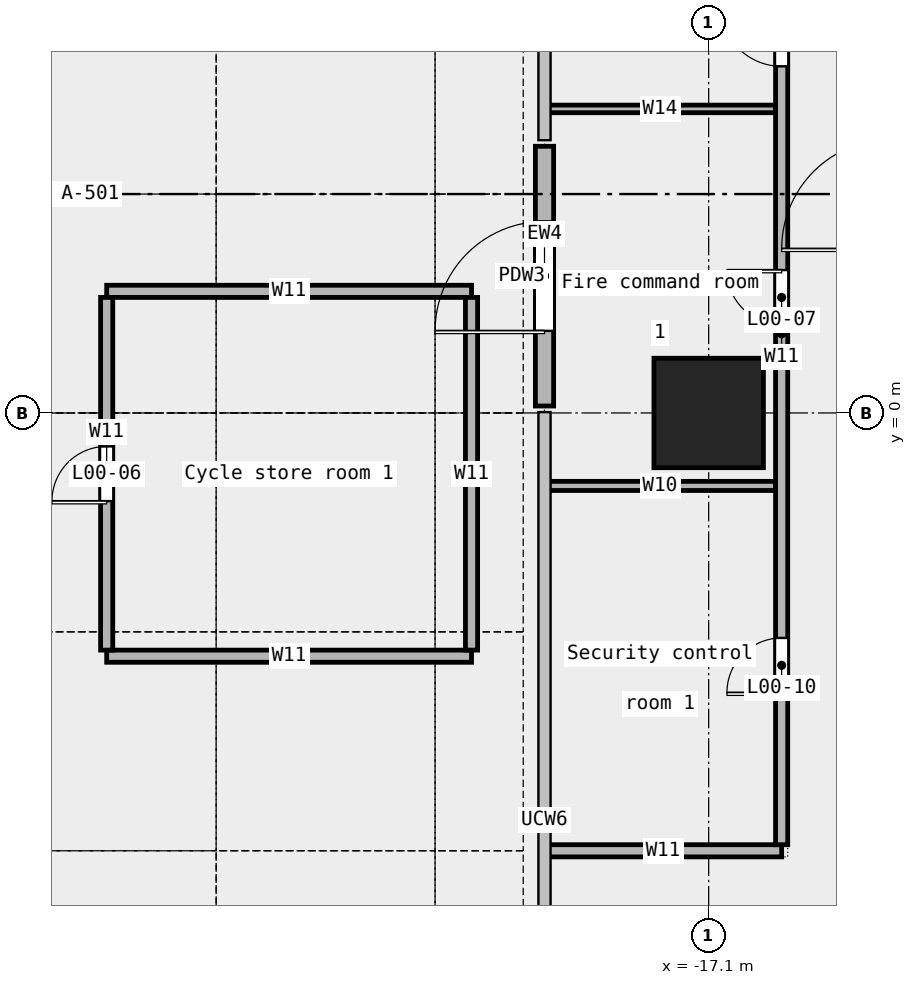
"""IFC4 building model, lengths in metres.
Left out: names, types, materials, properties, quantities, classifications, styles, units other than length and angle.
Written with IfcOpenShell. Run it as: python <this file> out.ifc"""

import sys

from ifc_helpers import new_model, si_unit, direction, frame, frame_2d, origin, origin_2d, place, context, subcontext, project, spatial, rectangle, extrude, element, fill, save


model = new_model("IFC4")
c1 = context("Model", 3, precision=1e-05, world=origin(), true_north=direction((0.0, 1.0)))
c2 = subcontext(c1, "Body", "Model", "MODEL_VIEW")
j1 = project(units=[si_unit("LENGTHUNIT", "METRE"), si_unit("PLANEANGLEUNIT", "RADIAN")], contexts=[c1])
p1 = place(None, origin())
s1 = spatial("IfcSite", under=j1, at=p1, CompositionType="ELEMENT")
p2 = place(p1, origin())
s2 = spatial("IfcBuilding", under=s1, at=p2, CompositionType="ELEMENT")
p3 = place(p2, origin())
s3 = spatial("IfcBuildingStorey", under=s2, at=p3, CompositionType="ELEMENT", Elevation=0.0)
p4 = place(p3, frame((-17.1, 0.0, 0.0), z_axis=(0.0, 0.0, 1.0), x_axis=(1.0, 0.0, 0.0)))
e1 = element("IfcColumn", 1, at=p4, inside=s3, PredefinedType="COLUMN", context=c2, shape_type="SweptSolid", body=[
    extrude(rectangle(XDim=1.8, YDim=1.8, at=origin_2d()), origin(), (0.0, 0.0, 1.0), 7.8),
])
p5 = place(p3, frame((-19.8, 0.114, 0.0), z_axis=(0.0, 0.0, 1.0), x_axis=(0.0, 1.0, 0.0)))
e2 = element("IfcWall", 2, at=p5, inside=s3, PredefinedType="STANDARD", context=c2, shape_type="SweptSolid", body=[
    extrude(rectangle(XDim=4.271, YDim=0.3, at=frame_2d((2.136, 0.0))), origin(), (0.0, 0.0, 1.0), 7.8),
])
p6 = place(p5, frame((1.236, 0.0, 0.0)))
e3 = element("IfcOpeningElement", 3, at=p6, cuts=e2, PredefinedType="OPENING", context=c2, shape_type="SweptSolid", body=[
    extrude(rectangle(XDim=1.8, YDim=2.4, at=frame_2d((0.9, 1.2))), frame((0.0, 0.162, 0.0), z_axis=(0.0, -1.0, 0.0), x_axis=(1.0, 0.0, 0.0)), (0.0, 0.0, 1.0), 0.324),
])
p7 = place(p3, frame((-19.8, -7.2, 0.0), z_axis=(0.0, 0.0, 1.0), x_axis=(1.0, 0.0, 0.0)))
e4 = element("IfcWall", 4, at=p7, inside=s3, PredefinedType="PARTITIONING", context=c2, shape_type="SweptSolid", body=[
    extrude(rectangle(XDim=3.9, YDim=0.2, at=frame_2d((1.95, 0.0))), origin(), (0.0, 0.0, 1.0), 7.8),
])
p8 = place(p3, frame((-27.0, -4.0, 0.0), z_axis=(0.0, 0.0, 1.0), x_axis=(1.0, 0.0, 0.0)))
e5 = element("IfcWall", 5, at=p8, inside=s3, PredefinedType="PARTITIONING", context=c2, shape_type="SweptSolid", body=[
    extrude(rectangle(XDim=6.0, YDim=0.2, at=frame_2d((3.0, 0.0))), origin(), (0.0, 0.0, 1.0), 7.8),
])
p9 = place(p3, frame((-19.8, -1.2, 0.0), z_axis=(0.0, 0.0, 1.0), x_axis=(1.0, 0.0, 0.0)))
e6 = element("IfcWall", 6, at=p9, inside=s3, PredefinedType="PARTITIONING", context=c2, shape_type="SweptSolid", body=[
    extrude(rectangle(XDim=3.8, YDim=0.15, at=frame_2d((1.9, 0.0))), origin(), (0.0, 0.0, 1.0), 7.8),
])
p10 = place(p3, frame((-27.0, 2.0, 0.0), z_axis=(0.0, 0.0, 1.0), x_axis=(1.0, 0.0, 0.0)))
e7 = element("IfcWall", 7, at=p10, inside=s3, PredefinedType="PARTITIONING", context=c2, shape_type="SweptSolid", body=[
    extrude(rectangle(XDim=6.0, YDim=0.2, at=frame_2d((3.0, 0.0))), origin(), (0.0, 0.0, 1.0), 7.8),
])
p11 = place(p3, frame((-19.8, 5.0, 0.0), z_axis=(0.0, 0.0, 1.0), x_axis=(1.0, 0.0, 0.0)))
e8 = element("IfcWall", 8, at=p11, inside=s3, PredefinedType="PARTITIONING", context=c2, shape_type="SweptSolid", body=[
    extrude(rectangle(XDim=3.8, YDim=0.125, at=frame_2d((1.9, 0.0))), origin(), (0.0, 0.0, 1.0), 7.8),
])
p12 = place(p3, frame((-27.0, -3.9, 0.0), z_axis=(0.0, 0.0, 1.0), x_axis=(0.0, 1.0, 0.0)))
e9 = element("IfcWall", 9, at=p12, inside=s3, PredefinedType="PARTITIONING", context=c2, shape_type="SweptSolid", body=[
    extrude(rectangle(XDim=5.8, YDim=0.2, at=frame_2d((2.9, 0.0))), origin(), (0.0, 0.0, 1.0), 7.8),
])
p13 = place(p12, frame((2.45, 0.0, 0.0)))
e10 = element("IfcOpeningElement", 10, at=p13, cuts=e9, PredefinedType="OPENING", context=c2, shape_type="SweptSolid", body=[
    extrude(rectangle(XDim=0.9, YDim=2.1, at=frame_2d((0.45, 1.05))), frame((0.0, 0.112, 0.0), z_axis=(0.0, -1.0, 0.0), x_axis=(1.0, 0.0, 0.0)), (0.0, 0.0, 1.0), 0.224),
])
p14 = place(p3, frame((-21.0, -3.9, 0.0), z_axis=(0.0, 0.0, 1.0), x_axis=(0.0, 1.0, 0.0)))
e11 = element("IfcWall", 11, at=p14, inside=s3, PredefinedType="PARTITIONING", context=c2, shape_type="SweptSolid", body=[
    extrude(rectangle(XDim=5.8, YDim=0.2, at=frame_2d((2.9, 0.0))), origin(), (0.0, 0.0, 1.0), 7.8),
])
p15 = place(p3, frame((-15.9, -7.1, 0.0), z_axis=(0.0, 0.0, 1.0), x_axis=(0.0, 1.0, 0.0)))
e12 = element("IfcWall", 12, at=p15, inside=s3, PredefinedType="PARTITIONING", context=c2, shape_type="SweptSolid", body=[
    extrude(rectangle(XDim=16.8, YDim=0.2, at=frame_2d((8.4, 0.0))), origin(), (0.0, 0.0, 1.0), 7.8),
])
p16 = place(p15, frame((12.8, 0.0, 0.0)))
e13 = element("IfcOpeningElement", 13, at=p16, cuts=e12, PredefinedType="OPENING", context=c2, shape_type="SweptSolid", body=[
    extrude(rectangle(XDim=1.0, YDim=2.1, at=frame_2d((0.5, 1.05))), frame((0.0, 0.112, 0.0), z_axis=(0.0, -1.0, 0.0), x_axis=(1.0, 0.0, 0.0)), (0.0, 0.0, 1.0), 0.224),
])
p17 = place(p15, frame((8.55, 0.0, 0.0)))
e14 = element("IfcOpeningElement", 14, at=p17, cuts=e12, PredefinedType="OPENING", context=c2, shape_type="SweptSolid", body=[
    extrude(rectangle(XDim=0.9, YDim=2.1, at=frame_2d((0.45, 1.05))), frame((0.0, 0.112, 0.0), z_axis=(0.0, -1.0, 0.0), x_axis=(1.0, 0.0, 0.0)), (0.0, 0.0, 1.0), 0.224),
])
p18 = place(p15, frame((2.5, 0.0, 0.0)))
e15 = element("IfcOpeningElement", 15, at=p18, cuts=e12, PredefinedType="OPENING", context=c2, shape_type="SweptSolid", body=[
    extrude(rectangle(XDim=0.9, YDim=2.1, at=frame_2d((0.45, 1.05))), frame((0.0, 0.112, 0.0), z_axis=(0.0, -1.0, 0.0), x_axis=(1.0, 0.0, 0.0)), (0.0, 0.0, 1.0), 0.224),
])
p19 = place(p6, origin())
e16 = element("IfcDoor", 16, at=p19, inside=s3, OperationType="DOUBLE_DOOR_SINGLE_SWING", PredefinedType="DOOR", context=c2, shape_type="SweptSolid", body=[
    extrude(rectangle(XDim=1.8, YDim=2.4, at=frame_2d((0.9, 1.2))), frame((0.0, 0.025, 0.0), z_axis=(0.0, -1.0, 0.0), x_axis=(1.0, 0.0, 0.0)), (0.0, 0.0, 1.0), 0.05),
])
fill(e3, e16)
p20 = place(p16, origin())
e17 = element("IfcDoor", 17, at=p20, inside=s3, OperationType="SINGLE_SWING_RIGHT", PredefinedType="DOOR", context=c2, shape_type="SweptSolid", body=[
    extrude(rectangle(XDim=1.0, YDim=2.1, at=frame_2d((0.5, 1.05))), frame((0.0, 0.025, 0.0), z_axis=(0.0, -1.0, 0.0), x_axis=(1.0, 0.0, 0.0)), (0.0, 0.0, 1.0), 0.05),
])
fill(e13, e17)
p21 = place(p13, origin())
e18 = element("IfcDoor", 18, at=p21, inside=s3, OperationType="SINGLE_SWING_LEFT", PredefinedType="DOOR", context=c2, shape_type="SweptSolid", body=[
    extrude(rectangle(XDim=0.9, YDim=2.1, at=frame_2d((0.45, 1.05))), frame((0.0, 0.025, 0.0), z_axis=(0.0, -1.0, 0.0), x_axis=(1.0, 0.0, 0.0)), (0.0, 0.0, 1.0), 0.05),
])
fill(e10, e18)
p22 = place(p17, origin())
e19 = element("IfcDoor", 19, at=p22, inside=s3, OperationType="SINGLE_SWING_RIGHT", PredefinedType="DOOR", context=c2, shape_type="SweptSolid", body=[
    extrude(rectangle(XDim=0.9, YDim=2.1, at=frame_2d((0.45, 1.05))), frame((0.0, 0.025, 0.0), z_axis=(0.0, -1.0, 0.0), x_axis=(1.0, 0.0, 0.0)), (0.0, 0.0, 1.0), 0.05),
])
fill(e14, e19)
p23 = place(p18, origin())
e20 = element("IfcDoor", 20, at=p23, inside=s3, OperationType="SINGLE_SWING_LEFT", PredefinedType="DOOR", context=c2, shape_type="SweptSolid", body=[
    extrude(rectangle(XDim=0.9, YDim=2.1, at=frame_2d((0.45, 1.05))), frame((0.0, 0.025, 0.0), z_axis=(0.0, -1.0, 0.0), x_axis=(1.0, 0.0, 0.0)), (0.0, 0.0, 1.0), 0.05),
])
fill(e15, e20)
save(model, sys.argv[1])
